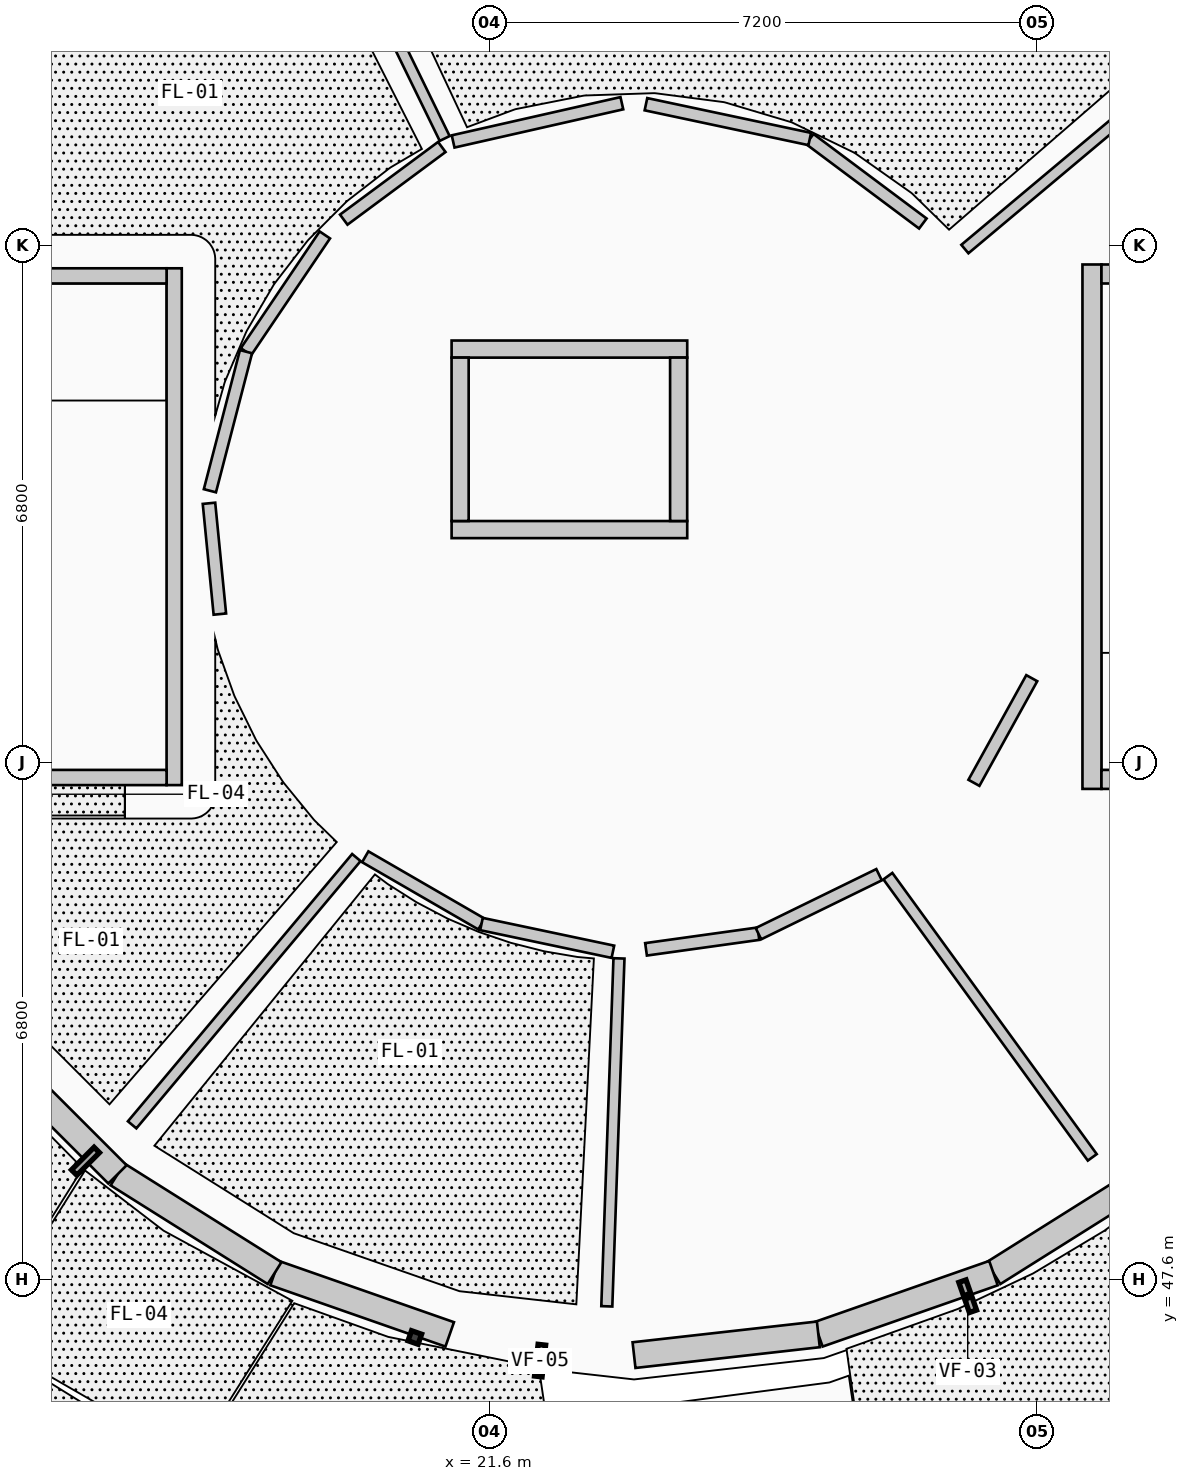
"""IFC4 building model, lengths in metres.
Left out: names, types, materials, properties, quantities, classifications, styles, units other than length and angle.
Written with IfcOpenShell. Run it as: python <this file> out.ifc"""

import sys

from ifc_helpers import new_model, si_unit, direction, frame, frame_2d, origin, origin_2d, place, context, subcontext, project, spatial, rectangle, circle, extrude, element, fill, save


model = new_model("IFC4")
c1 = context("Model", 3, precision=1e-05, world=origin(), true_north=direction((0.0, 1.0)))
c2 = subcontext(c1, "Body", "Model", "MODEL_VIEW")
j1 = project(units=[si_unit("LENGTHUNIT", "METRE"), si_unit("PLANEANGLEUNIT", "RADIAN")], contexts=[c1])
p1 = place(None, origin())
s1 = spatial("IfcSite", under=j1, at=p1, CompositionType="ELEMENT")
p2 = place(p1, origin())
s2 = spatial("IfcBuilding", under=s1, at=p2, CompositionType="ELEMENT")
p3 = place(p2, origin())
s3 = spatial("IfcBuildingStorey", under=s2, at=p3, CompositionType="ELEMENT", Elevation=0.0)
for number, where, z_axis, x_axis in (
    (1, (17.028, 49.385, 0.0), (0.0, 0.0, 1.0), (1.0, 0.0, 0.0)),
    (2, (21.19, 47.38, 0.0), (0.0, 0.0, 1.0), (1.0, 0.0, 0.0)),
    (3, (25.81, 47.38, 0.0), (0.0, 0.0, 1.0), (1.0, 0.0, 0.0)),
    (4, (29.972, 49.385, 0.0), (0.0, 0.0, 1.0), (1.0, 0.0, 0.0)),
):
    element("IfcColumn", number, at=place(p3, frame(where, z_axis=z_axis, x_axis=x_axis)), inside=s3, PredefinedType="PILASTER", context=c2, shape_type="SweptSolid", body=[
        extrude(circle(Radius=0.275, at=origin_2d()), origin(), (0.0, 0.0, 1.0), 4.55),
    ])
for number, where, z_axis, x_axis in (
    (5, (27.46, 61.46, 0.0), (0.0, 0.0, 1.0), (1.0, 0.0, 0.0)),
    (6, (23.5, 63.1, 0.0), (0.0, 0.0, 1.0), (1.0, 0.0, 0.0)),
    (7, (19.54, 61.46, 0.0), (0.0, 0.0, 1.0), (1.0, 0.0, 0.0)),
    (8, (19.54, 53.54, 0.0), (0.0, 0.0, 1.0), (1.0, 0.0, 0.0)),
    (9, (23.5, 51.9, 0.0), (0.0, 0.0, 1.0), (1.0, 0.0, 0.0)),
    (10, (27.46, 53.54, 0.0), (0.0, 0.0, 1.0), (1.0, 0.0, 0.0)),
):
    element("IfcColumn", number, at=place(p3, frame(where, z_axis=z_axis, x_axis=x_axis)), inside=s3, PredefinedType="COLUMN", context=c2, shape_type="SweptSolid", body=[
        extrude(rectangle(XDim=0.315, YDim=0.315, at=origin_2d()), origin(), (0.0, 0.0, 1.0), 4.55),
    ])
p4 = place(p3, frame((26.15, 46.154, 0.0), z_axis=(0.0, 0.0, 1.0), x_axis=(1.0, 0.0, 0.0)))
e11 = element("IfcColumn", 11, at=p4, inside=s3, PredefinedType="PILASTER", context=c2, shape_type="SweptSolid", body=[
    extrude(circle(Radius=0.275, at=origin_2d()), origin(), (0.0, 0.0, 1.0), 4.55),
])
p5 = place(p3, frame((30.296, 48.978, 0.0), z_axis=(0.0, 0.0, 1.0), x_axis=(-0.846658434148, -0.532136726684, 0.0)))
e12 = element("IfcWall", 12, at=p5, inside=s3, PredefinedType="SOLIDWALL", context=c2, shape_type="SweptSolid", body=[
    extrude(rectangle(XDim=2.441, YDim=0.34, at=frame_2d((1.221, 0.0))), origin(), (0.0, 0.0, 1.0), 3.659),
])
p6 = place(p3, frame((28.229, 47.679, 0.0), z_axis=(0.0, 0.0, 1.0), x_axis=(-0.943919156274, -0.330176659411, 0.0)))
e13 = element("IfcWall", 13, at=p6, inside=s3, PredefinedType="SOLIDWALL", context=c2, shape_type="SweptSolid", body=[
    extrude(rectangle(XDim=2.441, YDim=0.34, at=frame_2d((1.22, 0.0))), origin(), (0.0, 0.0, 1.0), 3.659),
])
p7 = place(p3, frame((25.925, 46.873, 0.0), z_axis=(0.0, 0.0, 1.0), x_axis=(-0.993725340882, -0.111847873866, 0.0)))
e14 = element("IfcWall", 14, at=p7, inside=s3, PredefinedType="SOLIDWALL", context=c2, shape_type="SweptSolid", body=[
    extrude(rectangle(XDim=2.44, YDim=0.34, at=frame_2d((1.22, 0.0))), origin(), (0.0, 0.0, 1.0), 3.659),
])
p8 = place(p3, frame((21.075, 46.873, 0.0), z_axis=(0.0, 0.0, 1.0), x_axis=(-0.943919156274, 0.330176659411, 0.0)))
e15 = element("IfcWall", 15, at=p8, inside=s3, PredefinedType="SOLIDWALL", context=c2, shape_type="SweptSolid", body=[
    extrude(rectangle(XDim=2.441, YDim=0.34, at=frame_2d((1.22, 0.0))), origin(), (0.0, 0.0, 1.0), 3.659),
])
p9 = place(p3, frame((18.771, 47.679, 0.0), z_axis=(0.0, 0.0, 1.0), x_axis=(-0.846658434148, 0.532136726684, 0.0)))
e16 = element("IfcWall", 16, at=p9, inside=s3, PredefinedType="SOLIDWALL", context=c2, shape_type="SweptSolid", body=[
    extrude(rectangle(XDim=2.441, YDim=0.34, at=frame_2d((1.221, 0.0))), origin(), (0.0, 0.0, 1.0), 3.659),
])
p10 = place(p9, frame((0.571, 0.0, 0.0)))
e17 = element("IfcOpeningElement", 17, at=p10, cuts=e16, PredefinedType="OPENING", context=c2, shape_type="SweptSolid", body=[
    extrude(rectangle(XDim=1.3, YDim=2.25, at=frame_2d((0.65, 1.125))), frame((0.0, 0.18, 0.0), z_axis=(0.0, -1.0, 0.0), x_axis=(1.0, 0.0, 0.0)), (0.0, 0.0, 1.0), 0.36),
])
p11 = place(p3, frame((16.704, 48.978, 0.0), z_axis=(0.0, 0.0, 1.0), x_axis=(-0.707106781187, 0.707106781187, 0.0)))
e18 = element("IfcWall", 18, at=p11, inside=s3, PredefinedType="SOLIDWALL", context=c2, shape_type="SweptSolid", body=[
    extrude(rectangle(XDim=2.441, YDim=0.34, at=frame_2d((1.22, 0.0))), origin(), (0.0, 0.0, 1.0), 3.659),
])
p12 = place(p3, frame((29.525, 60.95, 0.0), z_axis=(0.0, 0.0, 1.0), x_axis=(0.0, -1.0, 0.0)))
e19 = element("IfcWall", 19, at=p12, inside=s3, PredefinedType="SHEAR", context=c2, shape_type="SweptSolid", body=[
    extrude(rectangle(XDim=6.9, YDim=0.25, at=frame_2d((3.45, 0.0))), origin(), (0.0, 0.0, 1.0), 4.305),
])
p13 = place(p12, frame((0.43, 0.0, 0.0)))
e20 = element("IfcOpeningElement", 20, at=p13, cuts=e19, PredefinedType="OPENING", context=c2, shape_type="SweptSolid", body=[
    extrude(rectangle(XDim=1.1, YDim=2.15, at=frame_2d((0.55, 1.075))), frame((0.0, 0.135, 0.0), z_axis=(0.0, -1.0, 0.0), x_axis=(1.0, 0.0, 0.0)), (0.0, 0.0, 1.0), 0.27),
])
for number, where, z_axis, x_axis in (
    (21, (29.65, 60.825, 0.0), (0.0, 0.0, 1.0), (1.0, 0.0, 0.0)),
    (22, (29.65, 54.175, 0.0), (0.0, 0.0, 1.0), (1.0, 0.0, 0.0)),
):
    element("IfcWall", number, at=place(p3, frame(where, z_axis=z_axis, x_axis=x_axis)), inside=s3, PredefinedType="SHEAR", context=c2, shape_type="SweptSolid", body=[
        extrude(rectangle(XDim=2.9, YDim=0.25, at=frame_2d((1.45, 0.0))), origin(), (0.0, 0.0, 1.0), 4.305),
    ])
p14 = place(p3, frame((17.45, 54.1, 0.0), z_axis=(0.0, 0.0, 1.0), x_axis=(0.0, 1.0, 0.0)))
e23 = element("IfcWall", 23, at=p14, inside=s3, PredefinedType="SHEAR", context=c2, shape_type="SweptSolid", body=[
    extrude(rectangle(XDim=6.8, YDim=0.2, at=frame_2d((3.4, 0.0))), origin(), (0.0, 0.0, 1.0), 4.305),
])
p15 = place(p14, frame((0.38, 0.0, 0.0)))
e24 = element("IfcOpeningElement", 24, at=p15, cuts=e23, PredefinedType="OPENING", context=c2, shape_type="SweptSolid", body=[
    extrude(rectangle(XDim=1.05, YDim=2.15, at=frame_2d((0.525, 1.075))), frame((0.0, 0.11, 0.0), z_axis=(0.0, -1.0, 0.0), x_axis=(1.0, 0.0, 0.0)), (0.0, 0.0, 1.0), 0.22),
])
for number, where, z_axis, x_axis in (
    (25, (17.35, 54.2, 0.0), (0.0, 0.0, 1.0), (-1.0, 0.0, 0.0)),
    (26, (17.35, 60.8, 0.0), (0.0, 0.0, 1.0), (-1.0, 0.0, 0.0)),
):
    element("IfcWall", number, at=place(p3, frame(where, z_axis=z_axis, x_axis=x_axis)), inside=s3, PredefinedType="SHEAR", context=c2, shape_type="SweptSolid", body=[
        extrude(rectangle(XDim=2.9, YDim=0.2, at=frame_2d((1.45, 0.0))), origin(), (0.0, 0.0, 1.0), 4.305),
    ])
p16 = place(p3, frame((21.1, 57.462, 0.0), z_axis=(0.0, 0.0, 1.0), x_axis=(1.0, 0.0, 0.0)))
e27 = element("IfcWall", 27, at=p16, inside=s3, PredefinedType="SHEAR", context=c2, shape_type="SweptSolid", body=[
    extrude(rectangle(XDim=3.1, YDim=0.225, at=frame_2d((1.55, 0.0))), origin(), (0.0, 0.0, 1.0), 4.305),
])
p17 = place(p16, frame((0.95, 0.0, 0.0)))
e28 = element("IfcOpeningElement", 28, at=p17, cuts=e27, PredefinedType="OPENING", context=c2, shape_type="SweptSolid", body=[
    extrude(rectangle(XDim=1.2, YDim=2.2, at=frame_2d((0.6, 1.1))), frame((0.0, 0.123, 0.0), z_axis=(0.0, -1.0, 0.0), x_axis=(1.0, 0.0, 0.0)), (0.0, 0.0, 1.0), 0.245),
])
p18 = place(p3, frame((21.1, 59.837, 0.0), z_axis=(0.0, 0.0, 1.0), x_axis=(1.0, 0.0, 0.0)))
e29 = element("IfcWall", 29, at=p18, inside=s3, PredefinedType="SHEAR", context=c2, shape_type="SweptSolid", body=[
    extrude(rectangle(XDim=3.1, YDim=0.225, at=frame_2d((1.55, 0.0))), origin(), (0.0, 0.0, 1.0), 4.305),
])
for number, where, z_axis, x_axis in (
    (30, (21.212, 57.575, 0.0), (0.0, 0.0, 1.0), (0.0, 1.0, 0.0)),
    (31, (24.087, 57.575, 0.0), (0.0, 0.0, 1.0), (0.0, 1.0, 0.0)),
):
    element("IfcWall", number, at=place(p3, frame(where, z_axis=z_axis, x_axis=x_axis)), inside=s3, PredefinedType="SHEAR", context=c2, shape_type="SweptSolid", body=[
        extrude(rectangle(XDim=2.15, YDim=0.225, at=frame_2d((1.075, 0.0))), origin(), (0.0, 0.0, 1.0), 4.305),
    ])
p19 = place(p3, frame((27.853, 61.153, 0.0), z_axis=(0.0, 0.0, 1.0), x_axis=(0.766177182771, 0.64262938355, 0.0)))
e32 = element("IfcWall", 32, at=p19, inside=s3, PredefinedType="PARTITIONING", context=c2, shape_type="SweptSolid", body=[
    extrude(rectangle(XDim=4.59, YDim=0.145, at=frame_2d((2.295, 0.0))), origin(), (0.0, 0.0, 1.0), 3.634),
])
p20 = place(p3, frame((21.009, 62.608, 0.0), z_axis=(0.0, 0.0, 1.0), x_axis=(-0.438421545089, 0.898769463657, 0.0)))
e33 = element("IfcWall", 33, at=p20, inside=s3, PredefinedType="PARTITIONING", context=c2, shape_type="SweptSolid", body=[
    extrude(rectangle(XDim=4.61, YDim=0.145, at=frame_2d((2.305, 0.0))), origin(), (0.0, 0.0, 1.0), 3.634),
])
p21 = place(p3, frame((19.847, 53.147, 0.0), z_axis=(0.0, 0.0, 1.0), x_axis=(-0.64262938355, -0.766177182771, 0.0)))
e34 = element("IfcWall", 34, at=p21, inside=s3, PredefinedType="PARTITIONING", context=c2, shape_type="SweptSolid", body=[
    extrude(rectangle(XDim=4.59, YDim=0.145, at=frame_2d((2.295, 0.0))), origin(), (0.0, 0.0, 1.0), 3.634),
])
p22 = place(p3, frame((23.302, 51.82, 0.0), z_axis=(0.0, 0.0, 1.0), x_axis=(-0.034908318573, -0.999390518914, 0.0)))
e35 = element("IfcWall", 35, at=p22, inside=s3, PredefinedType="PARTITIONING", context=c2, shape_type="SweptSolid", body=[
    extrude(rectangle(XDim=4.581, YDim=0.145, at=frame_2d((2.291, 0.0))), origin(), (0.0, 0.0, 1.0), 3.634),
])
p23 = place(p3, frame((26.84, 52.902, 0.0), z_axis=(0.0, 0.0, 1.0), x_axis=(0.587873334136, -0.808952991843, 0.0)))
e36 = element("IfcWall", 36, at=p23, inside=s3, PredefinedType="PARTITIONING", context=c2, shape_type="SweptSolid", body=[
    extrude(rectangle(XDim=4.574, YDim=0.145, at=frame_2d((2.287, 0.0))), origin(), (0.0, 0.0, 1.0), 3.634),
])
p24 = place(p3, frame((27.3, 61.489, 0.0), z_axis=(0.0, 0.0, 1.0), x_axis=(-0.801023932766, 0.598632323831, 0.0)))
e37 = element("IfcWall", 37, at=p24, inside=s3, PredefinedType="PARTITIONING", context=c2, shape_type="SweptSolid", body=[
    extrude(rectangle(XDim=1.858, YDim=0.165, at=frame_2d((0.929, 0.0))), origin(), (0.0, 0.0, 1.0), 3.634),
])
p25 = place(p24, frame((0.289, 0.0, 0.0)))
e38 = element("IfcOpeningElement", 38, at=p25, cuts=e37, PredefinedType="OPENING", context=c2, shape_type="SweptSolid", body=[
    extrude(rectangle(XDim=1.28, YDim=2.3, at=frame_2d((0.64, 1.15))), frame((0.0, 0.093, 0.0), z_axis=(0.0, -1.0, 0.0), x_axis=(1.0, 0.0, 0.0)), (0.0, 0.0, 1.0), 0.185),
])
p26 = place(p3, frame((25.812, 62.601, 0.0), z_axis=(0.0, 0.0, 1.0), x_axis=(-0.978152936259, 0.207886587563, 0.0)))
e39 = element("IfcWall", 39, at=p26, inside=s3, PredefinedType="PARTITIONING", context=c2, shape_type="SweptSolid", body=[
    extrude(rectangle(XDim=2.203, YDim=0.165, at=frame_2d((1.102, 0.0))), origin(), (0.0, 0.0, 1.0), 3.634),
])
p27 = place(p3, frame((23.34, 63.072, 0.0), z_axis=(0.0, 0.0, 1.0), x_axis=(-0.975285396453, -0.2209488526, 0.0)))
e40 = element("IfcWall", 40, at=p27, inside=s3, PredefinedType="PARTITIONING", context=c2, shape_type="SweptSolid", body=[
    extrude(rectangle(XDim=2.276, YDim=0.165, at=frame_2d((1.138, 0.0))), origin(), (0.0, 0.0, 1.0), 3.634),
])
p28 = place(p3, frame((20.971, 62.496, 0.0), z_axis=(0.0, 0.0, 1.0), x_axis=(-0.803417109956, -0.59541661669, 0.0)))
e41 = element("IfcWall", 41, at=p28, inside=s3, PredefinedType="PARTITIONING", context=c2, shape_type="SweptSolid", body=[
    extrude(rectangle(XDim=1.606, YDim=0.165, at=frame_2d((0.803, 0.0))), origin(), (0.0, 0.0, 1.0), 3.634),
])
p29 = place(p28, frame((0.353, 0.0, 0.0)))
e42 = element("IfcOpeningElement", 42, at=p29, cuts=e41, PredefinedType="OPENING", context=c2, shape_type="SweptSolid", body=[
    extrude(rectangle(XDim=0.9, YDim=2.1, at=frame_2d((0.45, 1.05))), frame((0.0, 0.093, 0.0), z_axis=(0.0, -1.0, 0.0), x_axis=(1.0, 0.0, 0.0)), (0.0, 0.0, 1.0), 0.185),
])
p30 = place(p3, frame((19.432, 61.339, 0.0), z_axis=(0.0, 0.0, 1.0), x_axis=(-0.559463805142, -0.828854782659, 0.0)))
e43 = element("IfcWall", 43, at=p30, inside=s3, PredefinedType="PARTITIONING", context=c2, shape_type="SweptSolid", body=[
    extrude(rectangle(XDim=1.853, YDim=0.165, at=frame_2d((0.927, 0.0))), origin(), (0.0, 0.0, 1.0), 3.634),
])
p31 = place(p3, frame((18.395, 59.803, 0.0), z_axis=(0.0, 0.0, 1.0), x_axis=(-0.251275827958, -0.967915522287, 0.0)))
e44 = element("IfcWall", 44, at=p31, inside=s3, PredefinedType="PARTITIONING", context=c2, shape_type="SweptSolid", body=[
    extrude(rectangle(XDim=1.891, YDim=0.165, at=frame_2d((0.945, 0.0))), origin(), (0.0, 0.0, 1.0), 3.634),
])
p32 = place(p3, frame((17.908, 57.808, 0.0), z_axis=(0.0, 0.0, 1.0), x_axis=(0.097655572539, -0.995220271675, 0.0)))
e45 = element("IfcWall", 45, at=p32, inside=s3, PredefinedType="PARTITIONING", context=c2, shape_type="SweptSolid", body=[
    extrude(rectangle(XDim=1.465, YDim=0.165, at=frame_2d((0.732, 0.0))), origin(), (0.0, 0.0, 1.0), 3.634),
])
p33 = place(p3, frame((19.964, 53.157, 0.0), z_axis=(0.0, 0.0, 1.0), x_axis=(0.865448363254, -0.500998134269, 0.0)))
e46 = element("IfcWall", 46, at=p33, inside=s3, PredefinedType="PARTITIONING", context=c2, shape_type="SweptSolid", body=[
    extrude(rectangle(XDim=1.767, YDim=0.165, at=frame_2d((0.883, 0.0))), origin(), (0.0, 0.0, 1.0), 3.634),
])
p34 = place(p33, frame((0.403, 0.0, 0.0)))
e47 = element("IfcOpeningElement", 47, at=p34, cuts=e46, PredefinedType="OPENING", context=c2, shape_type="SweptSolid", body=[
    extrude(rectangle(XDim=0.96, YDim=2.12, at=frame_2d((0.48, 1.06))), frame((0.0, 0.093, 0.0), z_axis=(0.0, -1.0, 0.0), x_axis=(1.0, 0.0, 0.0)), (0.0, 0.0, 1.0), 0.185),
])
p35 = place(p3, frame((21.493, 52.272, 0.0), z_axis=(0.0, 0.0, 1.0), x_axis=(0.978436766116, -0.206546592113, 0.0)))
e48 = element("IfcWall", 48, at=p35, inside=s3, PredefinedType="PARTITIONING", context=c2, shape_type="SweptSolid", body=[
    extrude(rectangle(XDim=1.767, YDim=0.165, at=frame_2d((0.884, 0.0))), origin(), (0.0, 0.0, 1.0), 3.634),
])
p36 = place(p3, frame((23.658, 51.939, 0.0), z_axis=(0.0, 0.0, 1.0), x_axis=(0.99043401567, 0.137987175508, 0.0)))
e49 = element("IfcWall", 49, at=p36, inside=s3, PredefinedType="PARTITIONING", context=c2, shape_type="SweptSolid", body=[
    extrude(rectangle(XDim=1.493, YDim=0.165, at=frame_2d((0.747, 0.0))), origin(), (0.0, 0.0, 1.0), 3.634),
])
p37 = place(p36, frame((0.247, 0.0, 0.0)))
e50 = element("IfcOpeningElement", 50, at=p37, cuts=e49, PredefinedType="OPENING", context=c2, shape_type="SweptSolid", body=[
    extrude(rectangle(XDim=1.0, YDim=2.14, at=frame_2d((0.5, 1.07))), frame((0.0, 0.093, 0.0), z_axis=(0.0, -1.0, 0.0), x_axis=(1.0, 0.0, 0.0)), (0.0, 0.0, 1.0), 0.185),
])
p38 = place(p3, frame((25.137, 52.145, 0.0), z_axis=(0.0, 0.0, 1.0), x_axis=(0.898398901361, 0.439180388944, 0.0)))
e51 = element("IfcWall", 51, at=p38, inside=s3, PredefinedType="PARTITIONING", context=c2, shape_type="SweptSolid", body=[
    extrude(rectangle(XDim=1.767, YDim=0.165, at=frame_2d((0.883, 0.0))), origin(), (0.0, 0.0, 1.0), 3.634),
])
p39 = place(p3, frame((27.972, 54.13, 0.0), z_axis=(0.0, 0.0, 1.0), x_axis=(0.483639192056, 0.875267463069, 0.0)))
e52 = element("IfcWall", 52, at=p39, inside=s3, PredefinedType="PARTITIONING", context=c2, shape_type="SweptSolid", body=[
    extrude(rectangle(XDim=1.573, YDim=0.165, at=frame_2d((0.787, 0.0))), origin(), (0.0, 0.0, 1.0), 3.634),
])
p40 = place(p39, frame((0.267, 0.0, 0.0)))
e53 = element("IfcOpeningElement", 53, at=p40, cuts=e52, PredefinedType="OPENING", context=c2, shape_type="SweptSolid", body=[
    extrude(rectangle(XDim=1.04, YDim=2.14, at=frame_2d((0.52, 1.07))), frame((0.0, 0.093, 0.0), z_axis=(0.0, -1.0, 0.0), x_axis=(1.0, 0.0, 0.0)), (0.0, 0.0, 1.0), 0.185),
])
p41 = place(p10, origin())
e54 = element("IfcDoor", 54, at=p41, inside=s3, OperationType="SINGLE_SWING_RIGHT", PredefinedType="DOOR", context=c2, shape_type="SweptSolid", body=[
    extrude(rectangle(XDim=1.3, YDim=2.25, at=frame_2d((0.65, 1.125))), frame((0.0, 0.025, 0.0), z_axis=(0.0, -1.0, 0.0), x_axis=(1.0, 0.0, 0.0)), (0.0, 0.0, 1.0), 0.05),
])
fill(e17, e54)
p42 = place(p13, origin())
e55 = element("IfcDoor", 55, at=p42, inside=s3, OperationType="SINGLE_SWING_RIGHT", PredefinedType="DOOR", context=c2, shape_type="SweptSolid", body=[
    extrude(rectangle(XDim=1.1, YDim=2.15, at=frame_2d((0.55, 1.075))), frame((0.0, 0.025, 0.0), z_axis=(0.0, -1.0, 0.0), x_axis=(1.0, 0.0, 0.0)), (0.0, 0.0, 1.0), 0.05),
])
fill(e20, e55)
p43 = place(p15, origin())
e56 = element("IfcDoor", 56, at=p43, inside=s3, OperationType="SINGLE_SWING_LEFT", PredefinedType="DOOR", context=c2, shape_type="SweptSolid", body=[
    extrude(rectangle(XDim=1.05, YDim=2.15, at=frame_2d((0.525, 1.075))), frame((0.0, 0.025, 0.0), z_axis=(0.0, -1.0, 0.0), x_axis=(1.0, 0.0, 0.0)), (0.0, 0.0, 1.0), 0.05),
])
fill(e24, e56)
p44 = place(p17, origin())
e57 = element("IfcDoor", 57, at=p44, inside=s3, OperationType="DOUBLE_DOOR_SLIDING", PredefinedType="DOOR", context=c2, shape_type="SweptSolid", body=[
    extrude(rectangle(XDim=1.2, YDim=2.2, at=frame_2d((0.6, 1.1))), frame((0.0, 0.025, 0.0), z_axis=(0.0, -1.0, 0.0), x_axis=(1.0, 0.0, 0.0)), (0.0, 0.0, 1.0), 0.05),
])
fill(e28, e57)
p45 = place(p25, origin())
e58 = element("IfcDoor", 58, at=p45, inside=s3, OperationType="SINGLE_SWING_LEFT", PredefinedType="DOOR", context=c2, shape_type="SweptSolid", body=[
    extrude(rectangle(XDim=1.28, YDim=2.3, at=frame_2d((0.64, 1.15))), frame((0.0, 0.025, 0.0), z_axis=(0.0, -1.0, 0.0), x_axis=(1.0, 0.0, 0.0)), (0.0, 0.0, 1.0), 0.05),
])
fill(e38, e58)
p46 = place(p29, origin())
e59 = element("IfcDoor", 59, at=p46, inside=s3, OperationType="SINGLE_SWING_RIGHT", PredefinedType="DOOR", context=c2, shape_type="SweptSolid", body=[
    extrude(rectangle(XDim=0.9, YDim=2.1, at=frame_2d((0.45, 1.05))), frame((0.0, 0.025, 0.0), z_axis=(0.0, -1.0, 0.0), x_axis=(1.0, 0.0, 0.0)), (0.0, 0.0, 1.0), 0.05),
])
fill(e42, e59)
p47 = place(p34, origin())
e60 = element("IfcDoor", 60, at=p47, inside=s3, OperationType="SINGLE_SWING_LEFT", PredefinedType="DOOR", context=c2, shape_type="SweptSolid", body=[
    extrude(rectangle(XDim=0.96, YDim=2.12, at=frame_2d((0.48, 1.06))), frame((0.0, 0.025, 0.0), z_axis=(0.0, -1.0, 0.0), x_axis=(1.0, 0.0, 0.0)), (0.0, 0.0, 1.0), 0.05),
])
fill(e47, e60)
p48 = place(p37, origin())
e61 = element("IfcDoor", 61, at=p48, inside=s3, OperationType="SINGLE_SWING_RIGHT", PredefinedType="DOOR", context=c2, shape_type="SweptSolid", body=[
    extrude(rectangle(XDim=1.0, YDim=2.14, at=frame_2d((0.5, 1.07))), frame((0.0, 0.025, 0.0), z_axis=(0.0, -1.0, 0.0), x_axis=(1.0, 0.0, 0.0)), (0.0, 0.0, 1.0), 0.05),
])
fill(e50, e61)
p49 = place(p40, origin())
e62 = element("IfcDoor", 62, at=p49, inside=s3, OperationType="SINGLE_SWING_LEFT", PredefinedType="DOOR", context=c2, shape_type="SweptSolid", body=[
    extrude(rectangle(XDim=1.04, YDim=2.14, at=frame_2d((0.52, 1.07))), frame((0.0, 0.025, 0.0), z_axis=(0.0, -1.0, 0.0), x_axis=(1.0, 0.0, 0.0)), (0.0, 0.0, 1.0), 0.05),
])
fill(e53, e62)
save(model, sys.argv[1])
